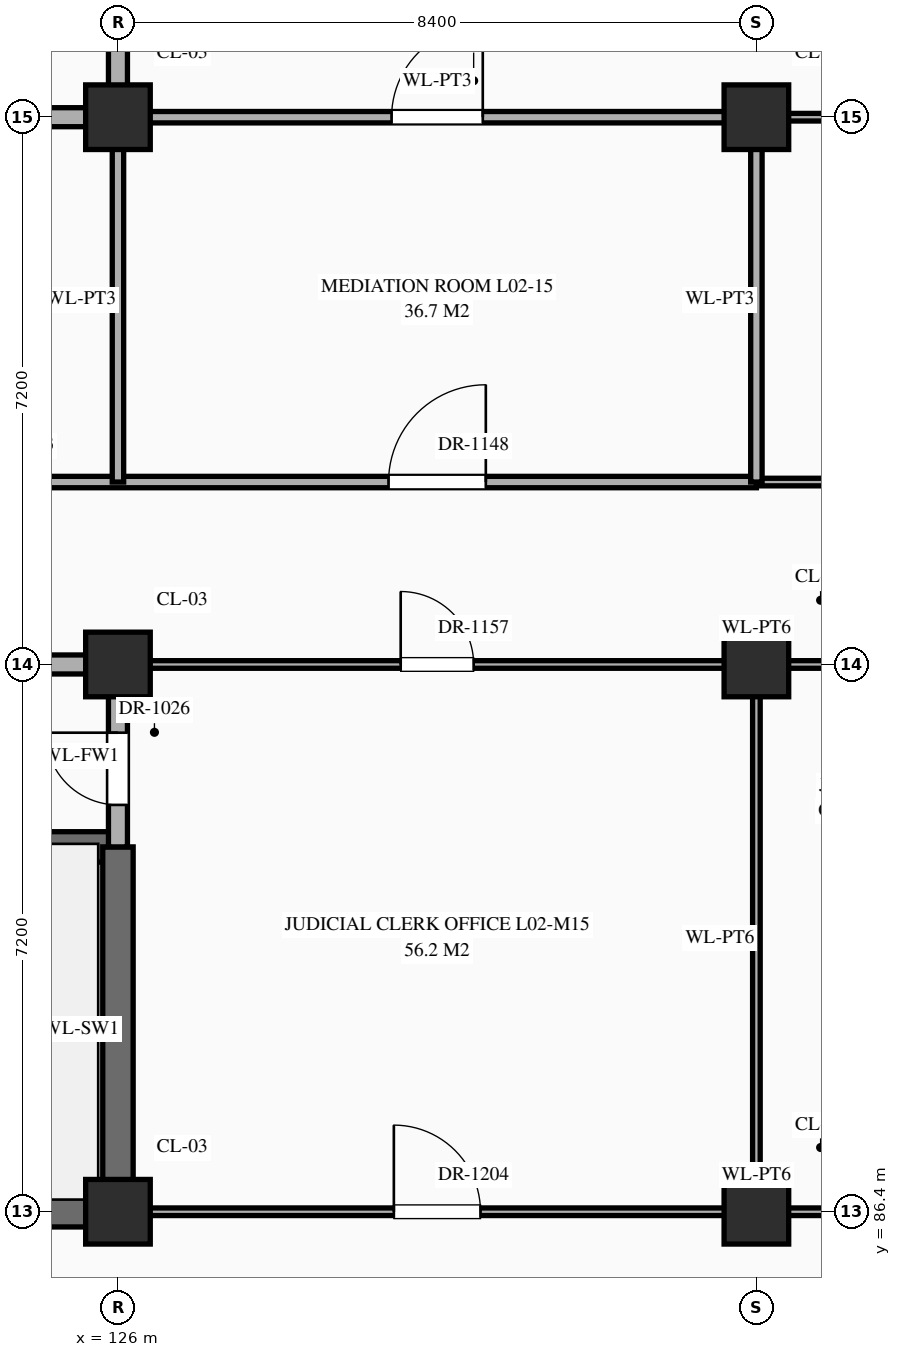
"""IFC4 building model, lengths in metres.
Left out: names, types, materials, properties, quantities, classifications, styles, units other than length and angle.
Written with IfcOpenShell. Run it as: python <this file> out.ifc"""

import sys

from ifc_helpers import new_model, si_unit, direction, frame, frame_2d, origin, origin_2d, place, context, subcontext, project, spatial, rectangle, extrude, element, fill, save


model = new_model("IFC4")
c1 = context("Model", 3, precision=1e-05, world=origin(), true_north=direction((0.0, 1.0)))
c2 = subcontext(c1, "Body", "Model", "MODEL_VIEW")
j1 = project(units=[si_unit("LENGTHUNIT", "METRE"), si_unit("PLANEANGLEUNIT", "RADIAN")], contexts=[c1])
p1 = place(None, origin())
s1 = spatial("IfcSite", under=j1, at=p1, CompositionType="ELEMENT")
p2 = place(p1, origin())
s2 = spatial("IfcBuilding", under=s1, at=p2, CompositionType="ELEMENT")
p3 = place(p2, frame((0.0, 0.0, 5.4)))
s3 = spatial("IfcBuildingStorey", under=s2, at=p3, CompositionType="ELEMENT", Elevation=5.4)
for number, where, z_axis, x_axis in (
    (1, (126.0, 86.4, 0.0), (0.0, 0.0, 1.0), (1.0, 0.0, 0.0)),
    (2, (126.0, 93.6, 0.0), (0.0, 0.0, 1.0), (1.0, 0.0, 0.0)),
    (3, (126.0, 100.8, 0.0), (0.0, 0.0, 1.0), (1.0, 0.0, 0.0)),
    (4, (134.4, 86.4, 0.0), (0.0, 0.0, 1.0), (1.0, 0.0, 0.0)),
    (5, (134.4, 93.6, 0.0), (0.0, 0.0, 1.0), (1.0, 0.0, 0.0)),
    (6, (134.4, 100.8, 0.0), (0.0, 0.0, 1.0), (1.0, 0.0, 0.0)),
):
    element("IfcColumn", number, at=place(p3, frame(where, z_axis=z_axis, x_axis=x_axis)), inside=s3, PredefinedType="COLUMN", context=c2, shape_type="SweptSolid", body=[
        extrude(rectangle(XDim=0.85, YDim=0.85, at=origin_2d()), origin(), (0.0, 0.0, 1.0), 5.4),
    ])
p4 = place(p3, frame((117.6, 86.4, 0.0), z_axis=(0.0, 0.0, 1.0), x_axis=(1.0, 0.0, 0.0)))
e7 = element("IfcWall", 7, at=p4, inside=s3, PredefinedType="SHEAR", context=c2, shape_type="SweptSolid", body=[
    extrude(rectangle(XDim=8.4, YDim=0.4, at=frame_2d((4.2, 0.0))), origin(), (0.0, 0.0, 1.0), 5.12),
])
p5 = place(p3, frame((126.0, 86.4, 0.0), z_axis=(0.0, 0.0, 1.0), x_axis=(1.0, 0.0, 0.0)))
e8 = element("IfcWall", 8, at=p5, inside=s3, PredefinedType="STANDARD", context=c2, shape_type="SweptSolid", body=[
    extrude(rectangle(XDim=16.8, YDim=0.1, at=frame_2d((8.4, 0.0))), origin(), (0.0, 0.0, 1.0), 4.27),
])
p6 = place(p5, frame((3.63, 0.0, 0.0)))
e9 = element("IfcOpeningElement", 9, at=p6, cuts=e8, PredefinedType="OPENING", context=c2, shape_type="SweptSolid", body=[
    extrude(rectangle(XDim=1.14, YDim=2.4, at=frame_2d((0.57, 1.2))), frame((0.0, 0.062, 0.0), z_axis=(0.0, -1.0, 0.0), x_axis=(1.0, 0.0, 0.0)), (0.0, 0.0, 1.0), 0.124),
])
p7 = place(p5, frame((9.542, 0.0, 0.0)))
e10 = element("IfcOpeningElement", 10, at=p7, cuts=e8, PredefinedType="OPENING", context=c2, shape_type="SweptSolid", body=[
    extrude(rectangle(XDim=0.86, YDim=2.1, at=frame_2d((0.43, 1.05))), frame((0.0, 0.062, 0.0), z_axis=(0.0, -1.0, 0.0), x_axis=(1.0, 0.0, 0.0)), (0.0, 0.0, 1.0), 0.124),
])
p8 = place(p5, frame((11.875, 0.0, 0.0)))
e11 = element("IfcOpeningElement", 11, at=p8, cuts=e8, PredefinedType="OPENING", context=c2, shape_type="SweptSolid", body=[
    extrude(rectangle(XDim=1.45, YDim=2.3, at=frame_2d((0.725, 1.15))), frame((0.0, 0.062, 0.0), z_axis=(0.0, -1.0, 0.0), x_axis=(1.0, 0.0, 0.0)), (0.0, 0.0, 1.0), 0.124),
])
p9 = place(p5, frame((14.728, 0.0, 0.0)))
e12 = element("IfcOpeningElement", 12, at=p9, cuts=e8, PredefinedType="OPENING", context=c2, shape_type="SweptSolid", body=[
    extrude(rectangle(XDim=1.0, YDim=2.25, at=frame_2d((0.5, 1.125))), frame((0.0, 0.062, 0.0), z_axis=(0.0, -1.0, 0.0), x_axis=(1.0, 0.0, 0.0)), (0.0, 0.0, 1.0), 0.124),
])
p10 = place(p3, frame((117.6, 91.2, 0.0), z_axis=(0.0, 0.0, 1.0), x_axis=(1.0, 0.0, 0.0)))
e13 = element("IfcWall", 13, at=p10, inside=s3, PredefinedType="SHEAR", context=c2, shape_type="SweptSolid", body=[
    extrude(rectangle(XDim=8.4, YDim=0.4, at=frame_2d((4.2, 0.0))), origin(), (0.0, 0.0, 1.0), 5.12),
])
p11 = place(p10, frame((0.65, 0.0, 0.0)))
e14 = element("IfcOpeningElement", 14, at=p11, cuts=e13, PredefinedType="OPENING", context=c2, shape_type="SweptSolid", body=[
    extrude(rectangle(XDim=1.1, YDim=2.2, at=frame_2d((0.55, 1.1))), frame((0.0, 0.212, 0.0), z_axis=(0.0, -1.0, 0.0), x_axis=(1.0, 0.0, 0.0)), (0.0, 0.0, 1.0), 0.424),
])
p12 = place(p3, frame((117.6, 93.6, 0.0), z_axis=(0.0, 0.0, 1.0), x_axis=(1.0, 0.0, 0.0)))
e15 = element("IfcWall", 15, at=p12, inside=s3, PredefinedType="STANDARD", context=c2, shape_type="SweptSolid", body=[
    extrude(rectangle(XDim=8.4, YDim=0.25, at=frame_2d((4.2, 0.0))), origin(), (0.0, 0.0, 1.0), 4.27),
])
p13 = place(p12, frame((3.462, 0.0, 0.0)))
e16 = element("IfcOpeningElement", 16, at=p13, cuts=e15, PredefinedType="OPENING", context=c2, shape_type="SweptSolid", body=[
    extrude(rectangle(XDim=1.5, YDim=2.25, at=frame_2d((0.75, 1.125))), frame((0.0, 0.137, 0.0), z_axis=(0.0, -1.0, 0.0), x_axis=(1.0, 0.0, 0.0)), (0.0, 0.0, 1.0), 0.274),
])
p14 = place(p3, frame((126.0, 93.6, 0.0), z_axis=(0.0, 0.0, 1.0), x_axis=(1.0, 0.0, 0.0)))
e17 = element("IfcWall", 17, at=p14, inside=s3, PredefinedType="STANDARD", context=c2, shape_type="SweptSolid", body=[
    extrude(rectangle(XDim=16.8, YDim=0.1, at=frame_2d((8.4, 0.0))), origin(), (0.0, 0.0, 1.0), 4.27),
])
p15 = place(p14, frame((3.72, 0.0, 0.0)))
e18 = element("IfcOpeningElement", 18, at=p15, cuts=e17, PredefinedType="OPENING", context=c2, shape_type="SweptSolid", body=[
    extrude(rectangle(XDim=0.96, YDim=2.2, at=frame_2d((0.48, 1.1))), frame((0.0, 0.062, 0.0), z_axis=(0.0, -1.0, 0.0), x_axis=(1.0, 0.0, 0.0)), (0.0, 0.0, 1.0), 0.124),
])
p16 = place(p14, frame((9.472, 0.0, 0.0)))
e19 = element("IfcOpeningElement", 19, at=p16, cuts=e17, PredefinedType="OPENING", context=c2, shape_type="SweptSolid", body=[
    extrude(rectangle(XDim=1.0, YDim=2.25, at=frame_2d((0.5, 1.125))), frame((0.0, 0.062, 0.0), z_axis=(0.0, -1.0, 0.0), x_axis=(1.0, 0.0, 0.0)), (0.0, 0.0, 1.0), 0.124),
])
p17 = place(p14, frame((11.75, 0.0, 0.0)))
e20 = element("IfcOpeningElement", 20, at=p17, cuts=e17, PredefinedType="OPENING", context=c2, shape_type="SweptSolid", body=[
    extrude(rectangle(XDim=1.7, YDim=2.45, at=frame_2d((0.85, 1.225))), frame((0.0, 0.062, 0.0), z_axis=(0.0, -1.0, 0.0), x_axis=(1.0, 0.0, 0.0)), (0.0, 0.0, 1.0), 0.124),
])
p18 = place(p14, frame((14.688, 0.0, 0.0)))
e21 = element("IfcOpeningElement", 21, at=p18, cuts=e17, PredefinedType="OPENING", context=c2, shape_type="SweptSolid", body=[
    extrude(rectangle(XDim=1.08, YDim=2.25, at=frame_2d((0.54, 1.125))), frame((0.0, 0.062, 0.0), z_axis=(0.0, -1.0, 0.0), x_axis=(1.0, 0.0, 0.0)), (0.0, 0.0, 1.0), 0.124),
])
p19 = place(p3, frame((115.0, 96.0, 0.0), z_axis=(0.0, 0.0, 1.0), x_axis=(1.0, 0.0, 0.0)))
e22 = element("IfcWall", 22, at=p19, inside=s3, PredefinedType="STANDARD", context=c2, shape_type="SweptSolid", body=[
    extrude(rectangle(XDim=19.4, YDim=0.15, at=frame_2d((9.7, 0.0))), origin(), (0.0, 0.0, 1.0), 5.12),
])
p20 = place(p19, frame((0.82, 0.0, 0.0)))
e23 = element("IfcOpeningElement", 23, at=p20, cuts=e22, PredefinedType="OPENING", context=c2, shape_type="SweptSolid", body=[
    extrude(rectangle(XDim=0.96, YDim=2.2, at=frame_2d((0.48, 1.1))), frame((0.0, 0.087, 0.0), z_axis=(0.0, -1.0, 0.0), x_axis=(1.0, 0.0, 0.0)), (0.0, 0.0, 1.0), 0.174),
])
p21 = place(p19, frame((6.18, 0.0, 0.0)))
e24 = element("IfcOpeningElement", 24, at=p21, cuts=e22, PredefinedType="OPENING", context=c2, shape_type="SweptSolid", body=[
    extrude(rectangle(XDim=1.24, YDim=2.3, at=frame_2d((0.62, 1.15))), frame((0.0, 0.087, 0.0), z_axis=(0.0, -1.0, 0.0), x_axis=(1.0, 0.0, 0.0)), (0.0, 0.0, 1.0), 0.174),
])
p22 = place(p19, frame((14.56, 0.0, 0.0)))
e25 = element("IfcOpeningElement", 25, at=p22, cuts=e22, PredefinedType="OPENING", context=c2, shape_type="SweptSolid", body=[
    extrude(rectangle(XDim=1.28, YDim=2.35, at=frame_2d((0.64, 1.175))), frame((0.0, 0.087, 0.0), z_axis=(0.0, -1.0, 0.0), x_axis=(1.0, 0.0, 0.0)), (0.0, 0.0, 1.0), 0.174),
])
p23 = place(p3, frame((134.4, 96.0, 0.0), z_axis=(0.0, 0.0, 1.0), x_axis=(1.0, 0.0, 0.0)))
e26 = element("IfcWall", 26, at=p23, inside=s3, PredefinedType="STANDARD", context=c2, shape_type="SweptSolid", body=[
    extrude(rectangle(XDim=5.8, YDim=0.1, at=frame_2d((2.9, 0.0))), origin(), (0.0, 0.0, 1.0), 5.12),
])
p24 = place(p23, frame((1.23, 0.0, 0.0)))
e27 = element("IfcOpeningElement", 27, at=p24, cuts=e26, PredefinedType="OPENING", context=c2, shape_type="SweptSolid", body=[
    extrude(rectangle(XDim=0.94, YDim=2.3, at=frame_2d((0.47, 1.15))), frame((0.0, 0.062, 0.0), z_axis=(0.0, -1.0, 0.0), x_axis=(1.0, 0.0, 0.0)), (0.0, 0.0, 1.0), 0.124),
])
p25 = place(p23, frame((4.11, 0.0, 0.0)))
e28 = element("IfcOpeningElement", 28, at=p25, cuts=e26, PredefinedType="OPENING", context=c2, shape_type="SweptSolid", body=[
    extrude(rectangle(XDim=0.98, YDim=2.35, at=frame_2d((0.49, 1.175))), frame((0.0, 0.062, 0.0), z_axis=(0.0, -1.0, 0.0), x_axis=(1.0, 0.0, 0.0)), (0.0, 0.0, 1.0), 0.124),
])
p26 = place(p3, frame((121.8, 100.8, 0.0), z_axis=(0.0, 0.0, 1.0), x_axis=(1.0, 0.0, 0.0)))
e29 = element("IfcWall", 29, at=p26, inside=s3, PredefinedType="STANDARD", context=c2, shape_type="SweptSolid", body=[
    extrude(rectangle(XDim=4.2, YDim=0.25, at=frame_2d((2.1, 0.0))), origin(), (0.0, 0.0, 1.0), 4.27),
])
p27 = place(p3, frame((126.0, 100.8, 0.0), z_axis=(0.0, 0.0, 1.0), x_axis=(1.0, 0.0, 0.0)))
e30 = element("IfcWall", 30, at=p27, inside=s3, PredefinedType="STANDARD", context=c2, shape_type="SweptSolid", body=[
    extrude(rectangle(XDim=8.4, YDim=0.15, at=frame_2d((4.2, 0.0))), origin(), (0.0, 0.0, 1.0), 4.27),
])
p28 = place(p27, frame((3.6, 0.0, 0.0)))
e31 = element("IfcOpeningElement", 31, at=p28, cuts=e30, PredefinedType="OPENING", context=c2, shape_type="SweptSolid", body=[
    extrude(rectangle(XDim=1.2, YDim=2.35, at=frame_2d((0.6, 1.175))), frame((0.0, 0.087, 0.0), z_axis=(0.0, -1.0, 0.0), x_axis=(1.0, 0.0, 0.0)), (0.0, 0.0, 1.0), 0.174),
])
p29 = place(p3, frame((134.4, 100.8, 0.0), z_axis=(0.0, 0.0, 1.0), x_axis=(1.0, 0.0, 0.0)))
e32 = element("IfcWall", 32, at=p29, inside=s3, PredefinedType="STANDARD", context=c2, shape_type="SweptSolid", body=[
    extrude(rectangle(XDim=5.8, YDim=0.1, at=frame_2d((2.9, 0.0))), origin(), (0.0, 0.0, 1.0), 4.27),
])
p30 = place(p29, frame((1.252, 0.0, 0.0)))
e33 = element("IfcOpeningElement", 33, at=p30, cuts=e32, PredefinedType="OPENING", context=c2, shape_type="SweptSolid", body=[
    extrude(rectangle(XDim=1.24, YDim=2.3, at=frame_2d((0.62, 1.15))), frame((0.0, 0.062, 0.0), z_axis=(0.0, -1.0, 0.0), x_axis=(1.0, 0.0, 0.0)), (0.0, 0.0, 1.0), 0.124),
])
p31 = place(p29, frame((3.96, 0.0, 0.0)))
e34 = element("IfcOpeningElement", 34, at=p31, cuts=e32, PredefinedType="OPENING", context=c2, shape_type="SweptSolid", body=[
    extrude(rectangle(XDim=1.28, YDim=2.35, at=frame_2d((0.64, 1.175))), frame((0.0, 0.062, 0.0), z_axis=(0.0, -1.0, 0.0), x_axis=(1.0, 0.0, 0.0)), (0.0, 0.0, 1.0), 0.124),
])
p32 = place(p3, frame((126.0, 86.4, 0.0), z_axis=(0.0, 0.0, 1.0), x_axis=(0.0, 1.0, 0.0)))
e35 = element("IfcWall", 35, at=p32, inside=s3, PredefinedType="SHEAR", context=c2, shape_type="SweptSolid", body=[
    extrude(rectangle(XDim=4.8, YDim=0.4, at=frame_2d((2.4, 0.0))), origin(), (0.0, 0.0, 1.0), 5.12),
])
p33 = place(p3, frame((126.0, 91.2, 0.0), z_axis=(0.0, 0.0, 1.0), x_axis=(0.0, 1.0, 0.0)))
e36 = element("IfcWall", 36, at=p33, inside=s3, PredefinedType="STANDARD", context=c2, shape_type="SweptSolid", body=[
    extrude(rectangle(XDim=2.4, YDim=0.25, at=frame_2d((1.2, 0.0))), origin(), (0.0, 0.0, 1.0), 4.37),
])
p34 = place(p33, frame((0.552, 0.0, 0.0)))
e37 = element("IfcOpeningElement", 37, at=p34, cuts=e36, PredefinedType="OPENING", context=c2, shape_type="SweptSolid", body=[
    extrude(rectangle(XDim=0.95, YDim=2.15, at=frame_2d((0.475, 1.075))), frame((0.0, 0.137, 0.0), z_axis=(0.0, -1.0, 0.0), x_axis=(1.0, 0.0, 0.0)), (0.0, 0.0, 1.0), 0.274),
])
p35 = place(p3, frame((126.0, 96.0, 0.0), z_axis=(0.0, 0.0, 1.0), x_axis=(0.0, 1.0, 0.0)))
e38 = element("IfcWall", 38, at=p35, inside=s3, PredefinedType="STANDARD", context=c2, shape_type="SweptSolid", body=[
    extrude(rectangle(XDim=4.8, YDim=0.15, at=frame_2d((2.4, 0.0))), origin(), (0.0, 0.0, 1.0), 4.37),
])
p36 = place(p3, frame((126.0, 100.8, 0.0), z_axis=(0.0, 0.0, 1.0), x_axis=(0.0, 1.0, 0.0)))
e39 = element("IfcWall", 39, at=p36, inside=s3, PredefinedType="STANDARD", context=c2, shape_type="SweptSolid", body=[
    extrude(rectangle(XDim=3.6, YDim=0.25, at=frame_2d((1.8, 0.0))), origin(), (0.0, 0.0, 1.0), 4.37),
])
p37 = place(p36, frame((0.897, 0.0, 0.0)))
e40 = element("IfcOpeningElement", 40, at=p37, cuts=e39, PredefinedType="OPENING", context=c2, shape_type="SweptSolid", body=[
    extrude(rectangle(XDim=0.95, YDim=2.15, at=frame_2d((0.475, 1.075))), frame((0.0, 0.137, 0.0), z_axis=(0.0, -1.0, 0.0), x_axis=(1.0, 0.0, 0.0)), (0.0, 0.0, 1.0), 0.274),
])
p38 = place(p3, frame((134.4, 86.4, 0.0), z_axis=(0.0, 0.0, 1.0), x_axis=(0.0, 1.0, 0.0)))
e41 = element("IfcWall", 41, at=p38, inside=s3, PredefinedType="STANDARD", context=c2, shape_type="SweptSolid", body=[
    extrude(rectangle(XDim=7.2, YDim=0.1, at=frame_2d((3.6, 0.0))), origin(), (0.0, 0.0, 1.0), 4.37),
])
p39 = place(p3, frame((134.4, 96.0, 0.0), z_axis=(0.0, 0.0, 1.0), x_axis=(0.0, 1.0, 0.0)))
e42 = element("IfcWall", 42, at=p39, inside=s3, PredefinedType="STANDARD", context=c2, shape_type="SweptSolid", body=[
    extrude(rectangle(XDim=4.8, YDim=0.15, at=frame_2d((2.4, 0.0))), origin(), (0.0, 0.0, 1.0), 4.37),
])
p40 = place(p34, origin())
e43 = element("IfcDoor", 43, at=p40, inside=s3, OperationType="SINGLE_SWING_RIGHT", PredefinedType="DOOR", context=c2, shape_type="SweptSolid", body=[
    extrude(rectangle(XDim=0.95, YDim=2.15, at=frame_2d((0.475, 1.075))), frame((0.0, 0.025, 0.0), z_axis=(0.0, -1.0, 0.0), x_axis=(1.0, 0.0, 0.0)), (0.0, 0.0, 1.0), 0.05),
])
fill(e37, e43)
p41 = place(p28, origin())
e44 = element("IfcDoor", 44, at=p41, inside=s3, OperationType="SINGLE_SWING_RIGHT", PredefinedType="DOOR", context=c2, shape_type="SweptSolid", body=[
    extrude(rectangle(XDim=1.2, YDim=2.35, at=frame_2d((0.6, 1.175))), frame((0.0, 0.025, 0.0), z_axis=(0.0, -1.0, 0.0), x_axis=(1.0, 0.0, 0.0)), (0.0, 0.0, 1.0), 0.05),
])
fill(e31, e44)
p42 = place(p22, origin())
e45 = element("IfcDoor", 45, at=p42, inside=s3, OperationType="SINGLE_SWING_RIGHT", PredefinedType="DOOR", context=c2, shape_type="SweptSolid", body=[
    extrude(rectangle(XDim=1.28, YDim=2.35, at=frame_2d((0.64, 1.175))), frame((0.0, 0.025, 0.0), z_axis=(0.0, -1.0, 0.0), x_axis=(1.0, 0.0, 0.0)), (0.0, 0.0, 1.0), 0.05),
])
fill(e25, e45)
p43 = place(p15, origin())
e46 = element("IfcDoor", 46, at=p43, inside=s3, OperationType="SINGLE_SWING_LEFT", PredefinedType="DOOR", context=c2, shape_type="SweptSolid", body=[
    extrude(rectangle(XDim=0.96, YDim=2.2, at=frame_2d((0.48, 1.1))), frame((0.0, 0.025, 0.0), z_axis=(0.0, -1.0, 0.0), x_axis=(1.0, 0.0, 0.0)), (0.0, 0.0, 1.0), 0.05),
])
fill(e18, e46)
p44 = place(p6, origin())
e47 = element("IfcDoor", 47, at=p44, inside=s3, OperationType="SINGLE_SWING_LEFT", PredefinedType="DOOR", context=c2, shape_type="SweptSolid", body=[
    extrude(rectangle(XDim=1.14, YDim=2.4, at=frame_2d((0.57, 1.2))), frame((0.0, 0.025, 0.0), z_axis=(0.0, -1.0, 0.0), x_axis=(1.0, 0.0, 0.0)), (0.0, 0.0, 1.0), 0.05),
])
fill(e9, e47)
save(model, sys.argv[1])
